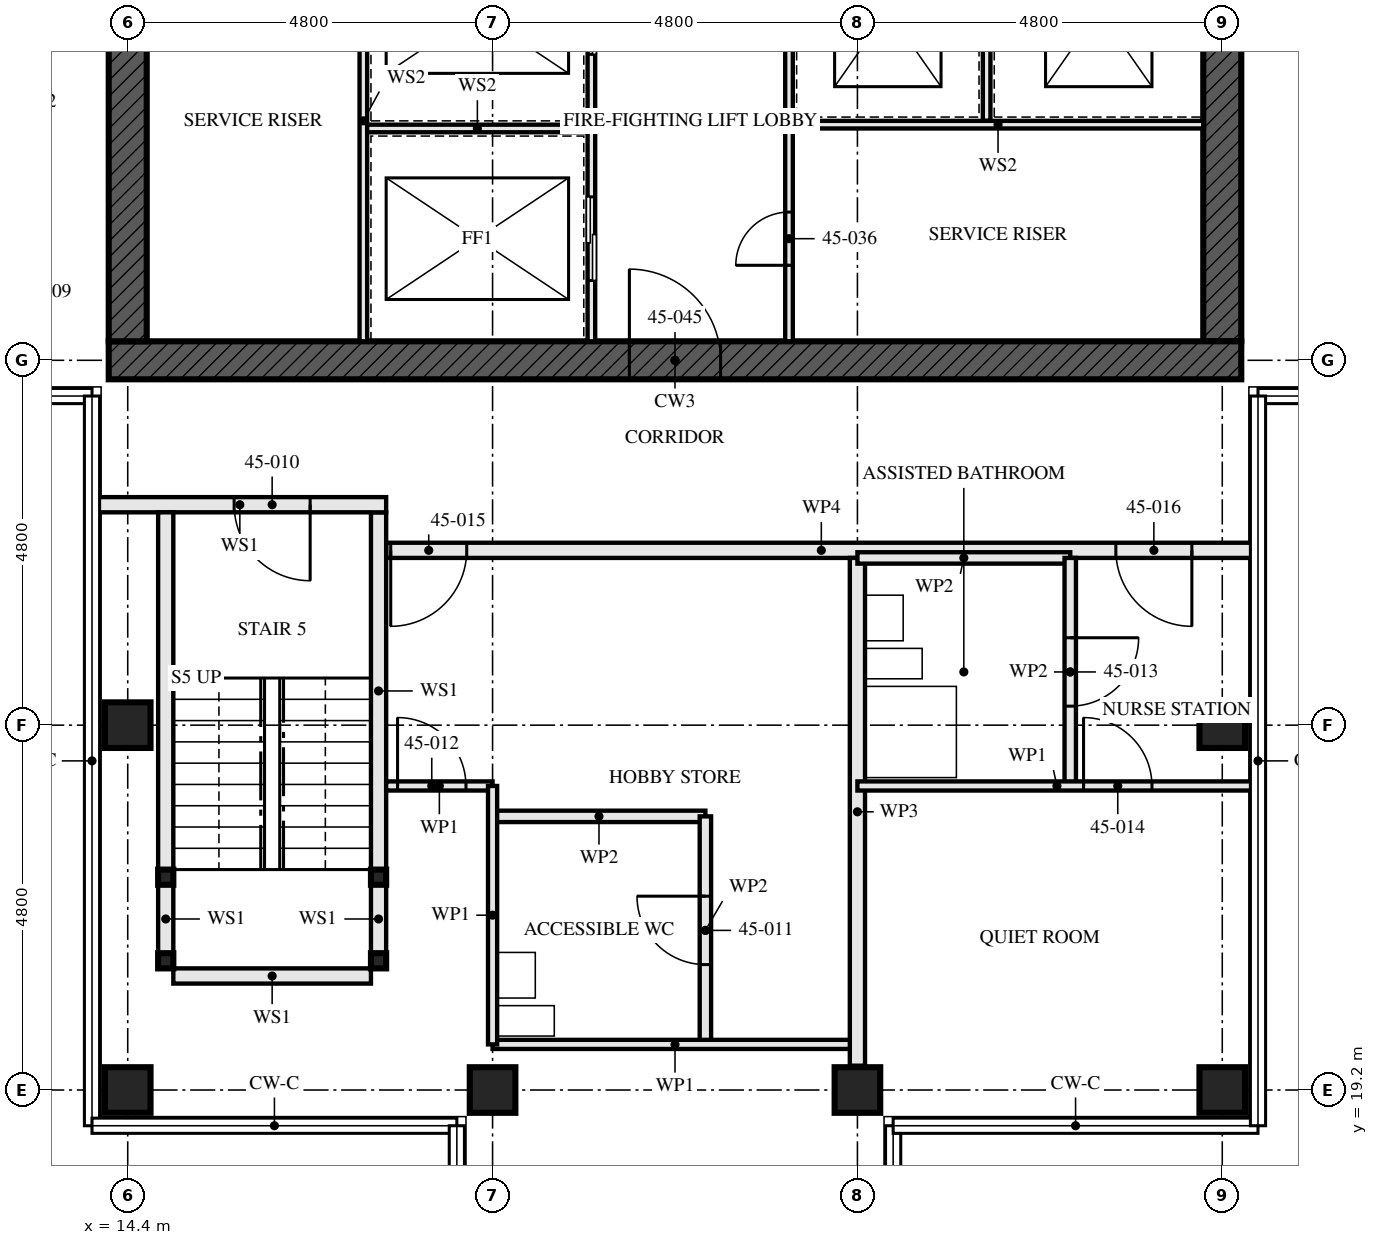
"""IFC4 building model, lengths in metres.
Left out: names, types, materials, properties, quantities, classifications, styles, units other than length and angle.
Written with IfcOpenShell. Run it as: python <this file> out.ifc"""

import sys

from ifc_helpers import new_model, si_unit, direction, frame, frame_2d, origin, origin_2d, place, context, subcontext, project, spatial, rectangle, hollow_rectangle, extrude, element, fill, save


model = new_model("IFC4")
c1 = context("Model", 3, precision=1e-05, world=origin(), true_north=direction((0.0, 1.0)))
c2 = subcontext(c1, "Body", "Model", "MODEL_VIEW")
j1 = project(units=[si_unit("LENGTHUNIT", "METRE"), si_unit("PLANEANGLEUNIT", "RADIAN")], contexts=[c1])
p1 = place(None, origin())
s1 = spatial("IfcSite", under=j1, at=p1, CompositionType="ELEMENT")
p2 = place(p1, origin())
s2 = spatial("IfcBuilding", under=s1, at=p2, CompositionType="ELEMENT")
p3 = place(p2, frame((0.0, 0.0, 165.5)))
s3 = spatial("IfcBuildingStorey", under=s2, at=p3, CompositionType="ELEMENT", Elevation=165.5)
p4 = place(p3, frame((14.4, 19.2, 0.0), z_axis=(0.0, 0.0, 1.0), x_axis=(0.0, 1.0, 0.0)))
e1 = element("IfcColumn", 1, at=p4, inside=s3, PredefinedType="COLUMN", context=c2, shape_type="SweptSolid", body=[
    extrude(hollow_rectangle(XDim=0.6, YDim=0.6, WallThickness=0.06, at=origin_2d()), origin(), (0.0, 0.0, 1.0), 3.5),
])
p5 = place(p3, frame((14.4, 24.0, 0.0), z_axis=(0.0, 0.0, 1.0), x_axis=(1.0, 0.0, 0.0)))
e2 = element("IfcColumn", 2, at=p5, inside=s3, PredefinedType="COLUMN", context=c2, shape_type="SweptSolid", body=[
    extrude(hollow_rectangle(XDim=0.6, YDim=0.6, WallThickness=0.08, at=origin_2d()), origin(), (0.0, 0.0, 1.0), 3.5),
])
for number, where, z_axis, x_axis in (
    (3, (19.2, 19.2, 0.0), (0.0, 0.0, 1.0), (0.0, 1.0, 0.0)),
    (4, (24.0, 19.2, 0.0), (0.0, 0.0, 1.0), (0.0, 1.0, 0.0)),
    (5, (28.8, 19.2, 0.0), (0.0, 0.0, 1.0), (0.0, 1.0, 0.0)),
):
    element("IfcColumn", number, at=place(p3, frame(where, z_axis=z_axis, x_axis=x_axis)), inside=s3, PredefinedType="COLUMN", context=c2, shape_type="SweptSolid", body=[
        extrude(hollow_rectangle(XDim=0.6, YDim=0.6, WallThickness=0.06, at=origin_2d()), origin(), (0.0, 0.0, 1.0), 3.5),
    ])
p6 = place(p3, frame((28.8, 24.0, 0.0), z_axis=(0.0, 0.0, 1.0), x_axis=(1.0, 0.0, 0.0)))
e6 = element("IfcColumn", 6, at=p6, inside=s3, PredefinedType="COLUMN", context=c2, shape_type="SweptSolid", body=[
    extrude(hollow_rectangle(XDim=0.6, YDim=0.6, WallThickness=0.08, at=origin_2d()), origin(), (0.0, 0.0, 1.0), 3.5),
])
p7 = place(p3, frame((14.15, 28.8, -0.17), z_axis=(0.0, 0.0, 1.0), x_axis=(1.0, 0.0, 0.0)))
e7 = element("IfcWall", 7, at=p7, inside=s3, PredefinedType="SHEAR", context=c2, shape_type="SweptSolid", body=[
    extrude(rectangle(XDim=14.9, YDim=0.5, at=frame_2d((7.45, 0.0))), origin(), (0.0, 0.0, 1.0), 3.5),
])
p8 = place(p7, frame((6.85, 0.0, 0.17)))
e8 = element("IfcOpeningElement", 8, at=p8, cuts=e7, PredefinedType="OPENING", context=c2, shape_type="SweptSolid", body=[
    extrude(rectangle(XDim=1.2, YDim=2.1, at=frame_2d((0.6, 1.05))), frame((0.0, 0.26, 0.0), z_axis=(0.0, -1.0, 0.0), x_axis=(1.0, 0.0, 0.0)), (0.0, 0.0, 1.0), 0.521),
])
p9 = place(p3, frame((14.4, 42.95, -0.17), z_axis=(0.0, 0.0, 1.0), x_axis=(0.0, -1.0, 0.0)))
e9 = element("IfcWall", 9, at=p9, inside=s3, PredefinedType="SHEAR", context=c2, shape_type="SweptSolid", body=[
    extrude(rectangle(XDim=13.9, YDim=0.5, at=frame_2d((6.95, 0.0))), origin(), (0.0, 0.0, 1.0), 3.5),
])
p10 = place(p9, frame((6.35, 0.0, 0.17)))
e10 = element("IfcOpeningElement", 10, at=p10, cuts=e9, PredefinedType="OPENING", context=c2, shape_type="SweptSolid", body=[
    extrude(rectangle(XDim=1.2, YDim=2.1, at=frame_2d((0.6, 1.05))), frame((0.0, 0.26, 0.0), z_axis=(0.0, -1.0, 0.0), x_axis=(1.0, 0.0, 0.0)), (0.0, 0.0, 1.0), 0.521),
])
p11 = place(p3, frame((28.8, 29.05, -0.17), z_axis=(0.0, 0.0, 1.0), x_axis=(0.0, 1.0, 0.0)))
e11 = element("IfcWall", 11, at=p11, inside=s3, PredefinedType="SHEAR", context=c2, shape_type="SweptSolid", body=[
    extrude(rectangle(XDim=13.9, YDim=0.5, at=frame_2d((6.95, 0.0))), origin(), (0.0, 0.0, 1.0), 3.5),
])
p12 = place(p11, frame((6.35, 0.0, 0.17)))
e12 = element("IfcOpeningElement", 12, at=p12, cuts=e11, PredefinedType="OPENING", context=c2, shape_type="SweptSolid", body=[
    extrude(rectangle(XDim=1.2, YDim=2.1, at=frame_2d((0.6, 1.05))), frame((0.0, 0.26, 0.0), z_axis=(0.0, -1.0, 0.0), x_axis=(1.0, 0.0, 0.0)), (0.0, 0.0, 1.0), 0.521),
])
for number, where, z_axis, x_axis in (
    (13, (14.9, 20.9, 0.0), (0.0, 0.0, 1.0), (1.0, 0.0, 0.0)),
    (14, (17.7, 20.9, 0.0), (0.0, 0.0, 1.0), (1.0, 0.0, 0.0)),
    (15, (14.9, 22.0, 0.0), (0.0, 0.0, 1.0), (1.0, 0.0, 0.0)),
    (16, (17.7, 22.0, 0.0), (0.0, 0.0, 1.0), (1.0, 0.0, 0.0)),
):
    element("IfcColumn", number, at=place(p3, frame(where, z_axis=z_axis, x_axis=x_axis)), inside=s3, PredefinedType="COLUMN", context=c2, shape_type="SweptSolid", body=[
        extrude(hollow_rectangle(XDim=0.2, YDim=0.2, WallThickness=0.008, at=origin_2d()), origin(), (0.0, 0.0, 1.0), 3.33),
    ])
p13 = place(p3, frame((14.9, 21.0, 0.0), z_axis=(0.0, 0.0, 1.0), x_axis=(0.0, 1.0, 0.0)))
e17 = element("IfcWall", 17, at=p13, inside=s3, PredefinedType="SOLIDWALL", context=c2, shape_type="SweptSolid", body=[
    extrude(rectangle(XDim=0.9, YDim=0.2, at=frame_2d((0.45, 0.0))), origin(), (0.0, 0.0, 1.0), 2.99),
])
p14 = place(p3, frame((14.9, 22.1, 0.0), z_axis=(0.0, 0.0, 1.0), x_axis=(0.0, 1.0, 0.0)))
e18 = element("IfcWall", 18, at=p14, inside=s3, PredefinedType="SOLIDWALL", context=c2, shape_type="SweptSolid", body=[
    extrude(rectangle(XDim=4.7, YDim=0.2, at=frame_2d((2.35, 0.0))), origin(), (0.0, 0.0, 1.0), 2.99),
])
p15 = place(p3, frame((17.7, 21.0, 0.0), z_axis=(0.0, 0.0, 1.0), x_axis=(0.0, 1.0, 0.0)))
e19 = element("IfcWall", 19, at=p15, inside=s3, PredefinedType="SOLIDWALL", context=c2, shape_type="SweptSolid", body=[
    extrude(rectangle(XDim=0.9, YDim=0.2, at=frame_2d((0.45, 0.0))), origin(), (0.0, 0.0, 1.0), 2.99),
])
p16 = place(p3, frame((17.7, 22.1, 0.0), z_axis=(0.0, 0.0, 1.0), x_axis=(0.0, 1.0, 0.0)))
e20 = element("IfcWall", 20, at=p16, inside=s3, PredefinedType="SOLIDWALL", context=c2, shape_type="SweptSolid", body=[
    extrude(rectangle(XDim=4.7, YDim=0.2, at=frame_2d((2.35, 0.0))), origin(), (0.0, 0.0, 1.0), 2.99),
])
p17 = place(p3, frame((15.0, 20.7, 0.0), z_axis=(0.0, 0.0, 1.0), x_axis=(1.0, 0.0, 0.0)))
e21 = element("IfcWall", 21, at=p17, inside=s3, PredefinedType="SOLIDWALL", context=c2, shape_type="SweptSolid", body=[
    extrude(rectangle(XDim=2.6, YDim=0.2, at=frame_2d((1.3, 0.0))), origin(), (0.0, 0.0, 1.0), 3.33),
])
p18 = place(p3, frame((13.95, 26.9, 0.0), z_axis=(0.0, 0.0, 1.0), x_axis=(1.0, 0.0, 0.0)))
e22 = element("IfcWall", 22, at=p18, inside=s3, PredefinedType="SOLIDWALL", context=c2, shape_type="SweptSolid", body=[
    extrude(rectangle(XDim=3.85, YDim=0.2, at=frame_2d((1.925, 0.0))), origin(), (0.0, 0.0, 1.0), 2.32),
])
p19 = place(p18, frame((1.85, 0.0, 0.0)))
e23 = element("IfcOpeningElement", 23, at=p19, cuts=e22, PredefinedType="OPENING", context=c2, shape_type="SweptSolid", body=[
    extrude(rectangle(XDim=1.0, YDim=2.1, at=frame_2d((0.5, 1.05))), frame((0.0, 0.111, 0.0), z_axis=(0.0, -1.0, 0.0), x_axis=(1.0, 0.0, 0.0)), (0.0, 0.0, 1.0), 0.221),
])
p20 = place(p3, frame((22.0, 19.8, 0.0), z_axis=(0.0, 0.0, 1.0), x_axis=(0.0, 1.0, 0.0)))
e24 = element("IfcWall", 24, at=p20, inside=s3, PredefinedType="PARTITIONING", context=c2, shape_type="SweptSolid", body=[
    extrude(rectangle(XDim=3.0, YDim=0.15, at=frame_2d((1.5, 0.0))), origin(), (0.0, 0.0, 1.0), 3.33),
])
p21 = place(p20, frame((1.05, 0.0, 0.0)))
e25 = element("IfcOpeningElement", 25, at=p21, cuts=e24, PredefinedType="OPENING", context=c2, shape_type="SweptSolid", body=[
    extrude(rectangle(XDim=0.9, YDim=2.1, at=frame_2d((0.45, 1.05))), frame((0.0, 0.085, 0.0), z_axis=(0.0, -1.0, 0.0), x_axis=(1.0, 0.0, 0.0)), (0.0, 0.0, 1.0), 0.171),
])
p22 = place(p3, frame((19.2, 22.8, 0.0), z_axis=(0.0, 0.0, 1.0), x_axis=(1.0, 0.0, 0.0)))
e26 = element("IfcWall", 26, at=p22, inside=s3, PredefinedType="PARTITIONING", context=c2, shape_type="SweptSolid", body=[
    extrude(rectangle(XDim=2.8, YDim=0.15, at=frame_2d((1.4, 0.0))), origin(), (0.0, 0.0, 1.0), 3.33),
])
p23 = place(p3, frame((17.8, 23.2, 0.0), z_axis=(0.0, 0.0, 1.0), x_axis=(1.0, 0.0, 0.0)))
e27 = element("IfcWall", 27, at=p23, inside=s3, PredefinedType="PARTITIONING", context=c2, shape_type="SweptSolid", body=[
    extrude(rectangle(XDim=1.4, YDim=0.12, at=frame_2d((0.7, 0.0))), origin(), (0.0, 0.0, 1.0), 3.33),
])
p24 = place(p23, frame((0.15, 0.0, 0.0)))
e28 = element("IfcOpeningElement", 28, at=p24, cuts=e27, PredefinedType="OPENING", context=c2, shape_type="SweptSolid", body=[
    extrude(rectangle(XDim=0.9, YDim=2.1, at=frame_2d((0.45, 1.05))), frame((0.0, 0.071, 0.0), z_axis=(0.0, -1.0, 0.0), x_axis=(1.0, 0.0, 0.0)), (0.0, 0.0, 1.0), 0.141),
])
p25 = place(p3, frame((19.2, 19.8, 0.0), z_axis=(0.0, 0.0, 1.0), x_axis=(1.0, 0.0, 0.0)))
e29 = element("IfcWall", 29, at=p25, inside=s3, PredefinedType="PARTITIONING", context=c2, shape_type="SweptSolid", body=[
    extrude(rectangle(XDim=4.8, YDim=0.12, at=frame_2d((2.4, 0.0))), origin(), (0.0, 0.0, 1.0), 3.33),
])
p26 = place(p3, frame((19.2, 19.8, 0.0), z_axis=(0.0, 0.0, 1.0), x_axis=(0.0, 1.0, 0.0)))
e30 = element("IfcWall", 30, at=p26, inside=s3, PredefinedType="PARTITIONING", context=c2, shape_type="SweptSolid", body=[
    extrude(rectangle(XDim=3.4, YDim=0.12, at=frame_2d((1.7, 0.0))), origin(), (0.0, 0.0, 1.0), 2.55),
])
p27 = place(p3, frame((24.0, 19.52, 0.0), z_axis=(0.0, 0.0, 1.0), x_axis=(0.0, 1.0, 0.0)))
e31 = element("IfcWall", 31, at=p27, inside=s3, PredefinedType="PARTITIONING", context=c2, shape_type="SweptSolid", body=[
    extrude(rectangle(XDim=6.68, YDim=0.2, at=frame_2d((3.34, 0.0))), origin(), (0.0, 0.0, 1.0), 2.55),
])
p28 = place(p3, frame((26.8, 23.2, 0.0), z_axis=(0.0, 0.0, 1.0), x_axis=(0.0, 1.0, 0.0)))
e32 = element("IfcWall", 32, at=p28, inside=s3, PredefinedType="PARTITIONING", context=c2, shape_type="SweptSolid", body=[
    extrude(rectangle(XDim=3.0, YDim=0.15, at=frame_2d((1.5, 0.0))), origin(), (0.0, 0.0, 1.0), 2.55),
])
p29 = place(p28, frame((1.05, 0.0, 0.0)))
e33 = element("IfcOpeningElement", 33, at=p29, cuts=e32, PredefinedType="OPENING", context=c2, shape_type="SweptSolid", body=[
    extrude(rectangle(XDim=0.9, YDim=2.1, at=frame_2d((0.45, 1.05))), frame((0.0, 0.085, 0.0), z_axis=(0.0, -1.0, 0.0), x_axis=(1.0, 0.0, 0.0)), (0.0, 0.0, 1.0), 0.171),
])
p30 = place(p3, frame((24.0, 26.2, 0.0), z_axis=(0.0, 0.0, 1.0), x_axis=(1.0, 0.0, 0.0)))
e34 = element("IfcWall", 34, at=p30, inside=s3, PredefinedType="PARTITIONING", context=c2, shape_type="SweptSolid", body=[
    extrude(rectangle(XDim=2.8, YDim=0.15, at=frame_2d((1.4, 0.0))), origin(), (0.0, 0.0, 1.0), 3.33),
])
p31 = place(p3, frame((24.0, 23.2, 0.0), z_axis=(0.0, 0.0, 1.0), x_axis=(1.0, 0.0, 0.0)))
e35 = element("IfcWall", 35, at=p31, inside=s3, PredefinedType="PARTITIONING", context=c2, shape_type="SweptSolid", body=[
    extrude(rectangle(XDim=5.25, YDim=0.12, at=frame_2d((2.625, 0.0))), origin(), (0.0, 0.0, 1.0), 2.32),
])
p32 = place(p31, frame((2.975, 0.0, 0.0)))
e36 = element("IfcOpeningElement", 36, at=p32, cuts=e35, PredefinedType="OPENING", context=c2, shape_type="SweptSolid", body=[
    extrude(rectangle(XDim=0.9, YDim=2.1, at=frame_2d((0.45, 1.05))), frame((0.0, 0.071, 0.0), z_axis=(0.0, -1.0, 0.0), x_axis=(1.0, 0.0, 0.0)), (0.0, 0.0, 1.0), 0.141),
])
p33 = place(p3, frame((17.8, 26.3, 0.0), z_axis=(0.0, 0.0, 1.0), x_axis=(1.0, 0.0, 0.0)))
e37 = element("IfcWall", 37, at=p33, inside=s3, PredefinedType="PARTITIONING", context=c2, shape_type="SweptSolid", body=[
    extrude(rectangle(XDim=11.45, YDim=0.2, at=frame_2d((5.725, 0.0))), origin(), (0.0, 0.0, 1.0), 2.32),
])
p34 = place(p33, frame((0.06, 0.0, 0.0)))
e38 = element("IfcOpeningElement", 38, at=p34, cuts=e37, PredefinedType="OPENING", context=c2, shape_type="SweptSolid", body=[
    extrude(rectangle(XDim=1.0, YDim=2.1, at=frame_2d((0.5, 1.05))), frame((0.0, 0.111, 0.0), z_axis=(0.0, -1.0, 0.0), x_axis=(1.0, 0.0, 0.0)), (0.0, 0.0, 1.0), 0.221),
])
p35 = place(p33, frame((9.6, 0.0, 0.0)))
e39 = element("IfcOpeningElement", 39, at=p35, cuts=e37, PredefinedType="OPENING", context=c2, shape_type="SweptSolid", body=[
    extrude(rectangle(XDim=1.0, YDim=2.1, at=frame_2d((0.5, 1.05))), frame((0.0, 0.111, 0.0), z_axis=(0.0, -1.0, 0.0), x_axis=(1.0, 0.0, 0.0)), (0.0, 0.0, 1.0), 0.221),
])
p36 = place(p3, frame((20.5, 29.05, 0.0), z_axis=(0.0, 0.0, 1.0), x_axis=(0.0, 1.0, 0.0)))
e40 = element("IfcWall", 40, at=p36, inside=s3, PredefinedType="SOLIDWALL", context=c2, shape_type="SweptSolid", body=[
    extrude(rectangle(XDim=5.8, YDim=0.1, at=frame_2d((2.9, 0.0))), origin(), (0.0, 0.0, 1.0), 3.33),
])
p37 = place(p36, frame((0.8, 0.0, 0.0)))
e41 = element("IfcOpeningElement", 41, at=p37, cuts=e40, PredefinedType="OPENING", context=c2, shape_type="SweptSolid", body=[
    extrude(rectangle(XDim=1.1, YDim=2.3, at=frame_2d((0.55, 1.15))), frame((0.0, 0.061, 0.0), z_axis=(0.0, -1.0, 0.0), x_axis=(1.0, 0.0, 0.0)), (0.0, 0.0, 1.0), 0.121),
])
p38 = place(p36, frame((3.775, 0.0, 0.0)))
e42 = element("IfcOpeningElement", 42, at=p38, cuts=e40, PredefinedType="OPENING", context=c2, shape_type="SweptSolid", body=[
    extrude(rectangle(XDim=1.1, YDim=2.3, at=frame_2d((0.55, 1.15))), frame((0.0, 0.061, 0.0), z_axis=(0.0, -1.0, 0.0), x_axis=(1.0, 0.0, 0.0)), (0.0, 0.0, 1.0), 0.121),
])
p39 = place(p3, frame((23.1, 29.05, 0.0), z_axis=(0.0, 0.0, 1.0), x_axis=(0.0, 1.0, 0.0)))
e43 = element("IfcWall", 43, at=p39, inside=s3, PredefinedType="SOLIDWALL", context=c2, shape_type="SweptSolid", body=[
    extrude(rectangle(XDim=5.8, YDim=0.1, at=frame_2d((2.9, 0.0))), origin(), (0.0, 0.0, 1.0), 3.33),
])
p40 = place(p39, frame((1.0, 0.0, 0.0)))
e44 = element("IfcOpeningElement", 44, at=p40, cuts=e43, PredefinedType="OPENING", context=c2, shape_type="SweptSolid", body=[
    extrude(rectangle(XDim=0.7, YDim=2.1, at=frame_2d((0.35, 1.05))), frame((0.0, 0.061, 0.0), z_axis=(0.0, -1.0, 0.0), x_axis=(1.0, 0.0, 0.0)), (0.0, 0.0, 1.0), 0.121),
])
p41 = place(p3, frame((17.5, 29.05, 0.0), z_axis=(0.0, 0.0, 1.0), x_axis=(0.0, 1.0, 0.0)))
e45 = element("IfcWall", 45, at=p41, inside=s3, PredefinedType="SOLIDWALL", context=c2, shape_type="SweptSolid", body=[
    extrude(rectangle(XDim=5.8, YDim=0.1, at=frame_2d((2.9, 0.0))), origin(), (0.0, 0.0, 1.0), 3.33),
])
p42 = place(p3, frame((17.55, 31.85, 0.0), z_axis=(0.0, 0.0, 1.0), x_axis=(1.0, 0.0, 0.0)))
e46 = element("IfcWall", 46, at=p42, inside=s3, PredefinedType="SOLIDWALL", context=c2, shape_type="SweptSolid", body=[
    extrude(rectangle(XDim=2.9, YDim=0.1, at=frame_2d((1.45, 0.0))), origin(), (0.0, 0.0, 1.0), 3.33),
])
p43 = place(p3, frame((25.7, 31.95, 0.0), z_axis=(0.0, 0.0, 1.0), x_axis=(0.0, 1.0, 0.0)))
e47 = element("IfcWall", 47, at=p43, inside=s3, PredefinedType="SOLIDWALL", context=c2, shape_type="SweptSolid", body=[
    extrude(rectangle(XDim=2.9, YDim=0.1, at=frame_2d((1.45, 0.0))), origin(), (0.0, 0.0, 1.0), 3.33),
])
p44 = place(p3, frame((23.15, 31.9, 0.0), z_axis=(0.0, 0.0, 1.0), x_axis=(1.0, 0.0, 0.0)))
e48 = element("IfcWall", 48, at=p44, inside=s3, PredefinedType="SOLIDWALL", context=c2, shape_type="SweptSolid", body=[
    extrude(rectangle(XDim=5.4, YDim=0.1, at=frame_2d((2.7, 0.0))), origin(), (0.0, 0.0, 1.0), 3.33),
])
p45 = place(p19, frame((1.0, 0.0, 0.0), z_axis=(0.0, 0.0, 1.0), x_axis=(-1.0, 0.0, 0.0)))
e49 = element("IfcDoor", 49, at=p45, inside=s3, OperationType="SINGLE_SWING_RIGHT", PredefinedType="DOOR", context=c2, shape_type="SweptSolid", body=[
    extrude(rectangle(XDim=1.0, YDim=2.1, at=frame_2d((0.5, 1.05))), frame((0.0, 0.032, 0.0), z_axis=(0.0, -1.0, 0.0), x_axis=(1.0, 0.0, 0.0)), (0.0, 0.0, 1.0), 0.064),
])
fill(e23, e49)
p46 = place(p21, origin())
e50 = element("IfcDoor", 50, at=p46, inside=s3, OperationType="SINGLE_SWING_LEFT", PredefinedType="DOOR", context=c2, shape_type="SweptSolid", body=[
    extrude(rectangle(XDim=0.9, YDim=2.1, at=frame_2d((0.45, 1.05))), frame((0.0, 0.022, 0.0), z_axis=(0.0, -1.0, 0.0), x_axis=(1.0, 0.0, 0.0)), (0.0, 0.0, 1.0), 0.044),
])
fill(e25, e50)
p47 = place(p24, origin())
e51 = element("IfcDoor", 51, at=p47, inside=s3, OperationType="SINGLE_SWING_RIGHT", PredefinedType="DOOR", context=c2, shape_type="SweptSolid", body=[
    extrude(rectangle(XDim=0.9, YDim=2.1, at=frame_2d((0.45, 1.05))), frame((0.0, 0.022, 0.0), z_axis=(0.0, -1.0, 0.0), x_axis=(1.0, 0.0, 0.0)), (0.0, 0.0, 1.0), 0.044),
])
fill(e28, e51)
p48 = place(p29, frame((0.9, 0.0, 0.0), z_axis=(0.0, 0.0, 1.0), x_axis=(-1.0, 0.0, 0.0)))
e52 = element("IfcDoor", 52, at=p48, inside=s3, OperationType="SINGLE_SWING_RIGHT", PredefinedType="DOOR", context=c2, shape_type="SweptSolid", body=[
    extrude(rectangle(XDim=0.9, YDim=2.1, at=frame_2d((0.45, 1.05))), frame((0.0, 0.022, 0.0), z_axis=(0.0, -1.0, 0.0), x_axis=(1.0, 0.0, 0.0)), (0.0, 0.0, 1.0), 0.044),
])
fill(e33, e52)
p49 = place(p32, origin())
e53 = element("IfcDoor", 53, at=p49, inside=s3, OperationType="SINGLE_SWING_RIGHT", PredefinedType="DOOR", context=c2, shape_type="SweptSolid", body=[
    extrude(rectangle(XDim=0.9, YDim=2.1, at=frame_2d((0.45, 1.05))), frame((0.0, 0.022, 0.0), z_axis=(0.0, -1.0, 0.0), x_axis=(1.0, 0.0, 0.0)), (0.0, 0.0, 1.0), 0.044),
])
fill(e36, e53)
p50 = place(p34, frame((1.0, 0.0, 0.0), z_axis=(0.0, 0.0, 1.0), x_axis=(-1.0, 0.0, 0.0)))
e54 = element("IfcDoor", 54, at=p50, inside=s3, OperationType="SINGLE_SWING_LEFT", PredefinedType="DOOR", context=c2, shape_type="SweptSolid", body=[
    extrude(rectangle(XDim=1.0, YDim=2.1, at=frame_2d((0.5, 1.05))), frame((0.0, 0.027, 0.0), z_axis=(0.0, -1.0, 0.0), x_axis=(1.0, 0.0, 0.0)), (0.0, 0.0, 1.0), 0.054),
])
fill(e38, e54)
p51 = place(p35, frame((1.0, 0.0, 0.0), z_axis=(0.0, 0.0, 1.0), x_axis=(-1.0, 0.0, 0.0)))
e55 = element("IfcDoor", 55, at=p51, inside=s3, OperationType="SINGLE_SWING_RIGHT", PredefinedType="DOOR", context=c2, shape_type="SweptSolid", body=[
    extrude(rectangle(XDim=1.0, YDim=2.1, at=frame_2d((0.5, 1.05))), frame((0.0, 0.027, 0.0), z_axis=(0.0, -1.0, 0.0), x_axis=(1.0, 0.0, 0.0)), (0.0, 0.0, 1.0), 0.054),
])
fill(e39, e55)
p52 = place(p37, origin())
e56 = element("IfcDoor", 56, at=p52, inside=s3, OperationType="SLIDING_TO_LEFT", PredefinedType="DOOR", context=c2, shape_type="SweptSolid", body=[
    extrude(rectangle(XDim=1.1, YDim=2.3, at=frame_2d((0.55, 1.15))), frame((0.0, 0.05, 0.0), z_axis=(0.0, -1.0, 0.0), x_axis=(1.0, 0.0, 0.0)), (0.0, 0.0, 1.0), 0.1),
])
fill(e41, e56)
p53 = place(p38, origin())
e57 = element("IfcDoor", 57, at=p53, inside=s3, OperationType="SLIDING_TO_LEFT", PredefinedType="DOOR", context=c2, shape_type="SweptSolid", body=[
    extrude(rectangle(XDim=1.1, YDim=2.3, at=frame_2d((0.55, 1.15))), frame((0.0, 0.05, 0.0), z_axis=(0.0, -1.0, 0.0), x_axis=(1.0, 0.0, 0.0)), (0.0, 0.0, 1.0), 0.1),
])
fill(e42, e57)
p54 = place(p40, origin())
e58 = element("IfcDoor", 58, at=p54, inside=s3, OperationType="SINGLE_SWING_RIGHT", PredefinedType="DOOR", context=c2, shape_type="SweptSolid", body=[
    extrude(rectangle(XDim=0.7, YDim=2.1, at=frame_2d((0.35, 1.05))), frame((0.0, 0.027, 0.0), z_axis=(0.0, -1.0, 0.0), x_axis=(1.0, 0.0, 0.0)), (0.0, 0.0, 1.0), 0.054),
])
fill(e44, e58)
p55 = place(p8, origin())
e59 = element("IfcDoor", 59, at=p55, inside=s3, OperationType="SINGLE_SWING_LEFT", PredefinedType="DOOR", context=c2, shape_type="SweptSolid", body=[
    extrude(rectangle(XDim=1.2, YDim=2.1, at=frame_2d((0.6, 1.05))), frame((0.0, 0.027, 0.0), z_axis=(0.0, -1.0, 0.0), x_axis=(1.0, 0.0, 0.0)), (0.0, 0.0, 1.0), 0.054),
])
fill(e8, e59)
save(model, sys.argv[1])
